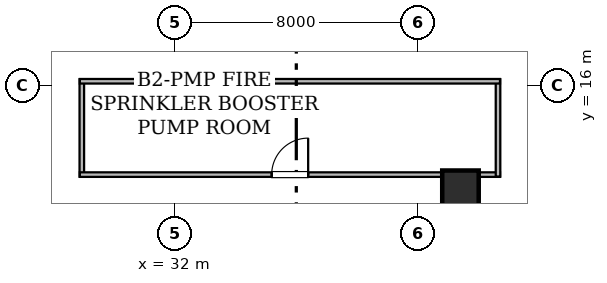
"""IFC4 building model, lengths in metres.
Left out: names, types, materials, properties, quantities, classifications, styles, units other than length and angle.
Written with IfcOpenShell. Run it as: python <this file> out.ifc"""

import sys

from ifc_helpers import new_model, si_unit, direction, frame, frame_2d, origin, origin_2d, place, context, subcontext, project, spatial, rectangle, hollow_rectangle, extrude, element, fill, save


model = new_model("IFC4")
c1 = context("Model", 3, precision=1e-05, world=origin(), true_north=direction((0.0, 1.0)))
c2 = subcontext(c1, "Body", "Model", "MODEL_VIEW")
j1 = project(units=[si_unit("LENGTHUNIT", "METRE"), si_unit("PLANEANGLEUNIT", "RADIAN")], contexts=[c1])
p1 = place(None, origin())
s1 = spatial("IfcSite", under=j1, at=p1, CompositionType="ELEMENT")
p2 = place(p1, origin())
s2 = spatial("IfcBuilding", under=s1, at=p2, CompositionType="ELEMENT")
p3 = place(p2, frame((0.0, 0.0, -9.0)))
s3 = spatial("IfcBuildingStorey", under=s2, at=p3, CompositionType="ELEMENT", Elevation=-9.0)
p4 = place(p3, frame((41.4, 12.6, 0.0), z_axis=(0.0, 0.0, 1.0), x_axis=(1.0, 0.0, 0.0)))
e1 = element("IfcColumn", 1, at=p4, inside=s3, PredefinedType="COLUMN", context=c2, shape_type="SweptSolid", body=[
    extrude(hollow_rectangle(XDim=1.2, YDim=1.2, WallThickness=0.06, at=origin_2d()), origin(), (0.0, 0.0, 1.0), 4.5),
])
p5 = place(p3, frame((28.945, 16.2, 0.0), z_axis=(0.0, 0.0, 1.0), x_axis=(0.0, -1.0, 0.0)))
e2 = element("IfcWall", 2, at=p5, inside=s3, PredefinedType="STANDARD", context=c2, shape_type="SweptSolid", body=[
    extrude(rectangle(XDim=3.2, YDim=0.15, at=frame_2d((1.6, 0.0))), origin(), (0.0, 0.0, 1.0), 4.18),
])
p6 = place(p3, frame((28.88, 13.065, 0.0), z_axis=(0.0, 0.0, 1.0), x_axis=(1.0, 0.0, 0.0)))
e3 = element("IfcWall", 3, at=p6, inside=s3, PredefinedType="STANDARD", context=c2, shape_type="SweptSolid", body=[
    extrude(rectangle(XDim=13.82, YDim=0.15, at=frame_2d((6.91, 0.0))), origin(), (0.0, 0.0, 1.0), 3.315),
])
p7 = place(p6, frame((6.31, 0.0, 0.0)))
e4 = element("IfcOpeningElement", 4, at=p7, cuts=e3, PredefinedType="OPENING", context=c2, shape_type="SweptSolid", body=[
    extrude(rectangle(XDim=1.2, YDim=2.15, at=frame_2d((0.6, 1.075))), frame((0.0, 0.085, 0.0), z_axis=(0.0, -1.0, 0.0), x_axis=(1.0, 0.0, 0.0)), (0.0, 0.0, 1.0), 0.17),
])
p8 = place(p3, frame((42.635, 13.002, 0.0), z_axis=(0.0, 0.0, 1.0), x_axis=(0.0, 1.0, 0.0)))
e5 = element("IfcWall", 5, at=p8, inside=s3, PredefinedType="STANDARD", context=c2, shape_type="SweptSolid", body=[
    extrude(rectangle(XDim=3.198, YDim=0.15, at=frame_2d((1.599, 0.0))), origin(), (0.0, 0.0, 1.0), 4.18),
])
p9 = place(p3, frame((42.7, 16.135, 0.0), z_axis=(0.0, 0.0, 1.0), x_axis=(-1.0, 0.0, 0.0)))
e6 = element("IfcWall", 6, at=p9, inside=s3, PredefinedType="STANDARD", context=c2, shape_type="SweptSolid", body=[
    extrude(rectangle(XDim=13.82, YDim=0.15, at=frame_2d((6.91, 0.0))), origin(), (0.0, 0.0, 1.0), 3.315),
])
p10 = place(p7, origin())
e7 = element("IfcDoor", 7, at=p10, inside=s3, OperationType="SINGLE_SWING_RIGHT", PredefinedType="DOOR", context=c2, shape_type="SweptSolid", body=[
    extrude(rectangle(XDim=1.2, YDim=2.15, at=frame_2d((0.6, 1.075))), frame((0.0, 0.025, 0.0), z_axis=(0.0, -1.0, 0.0), x_axis=(1.0, 0.0, 0.0)), (0.0, 0.0, 1.0), 0.05),
])
fill(e4, e7)
save(model, sys.argv[1])
